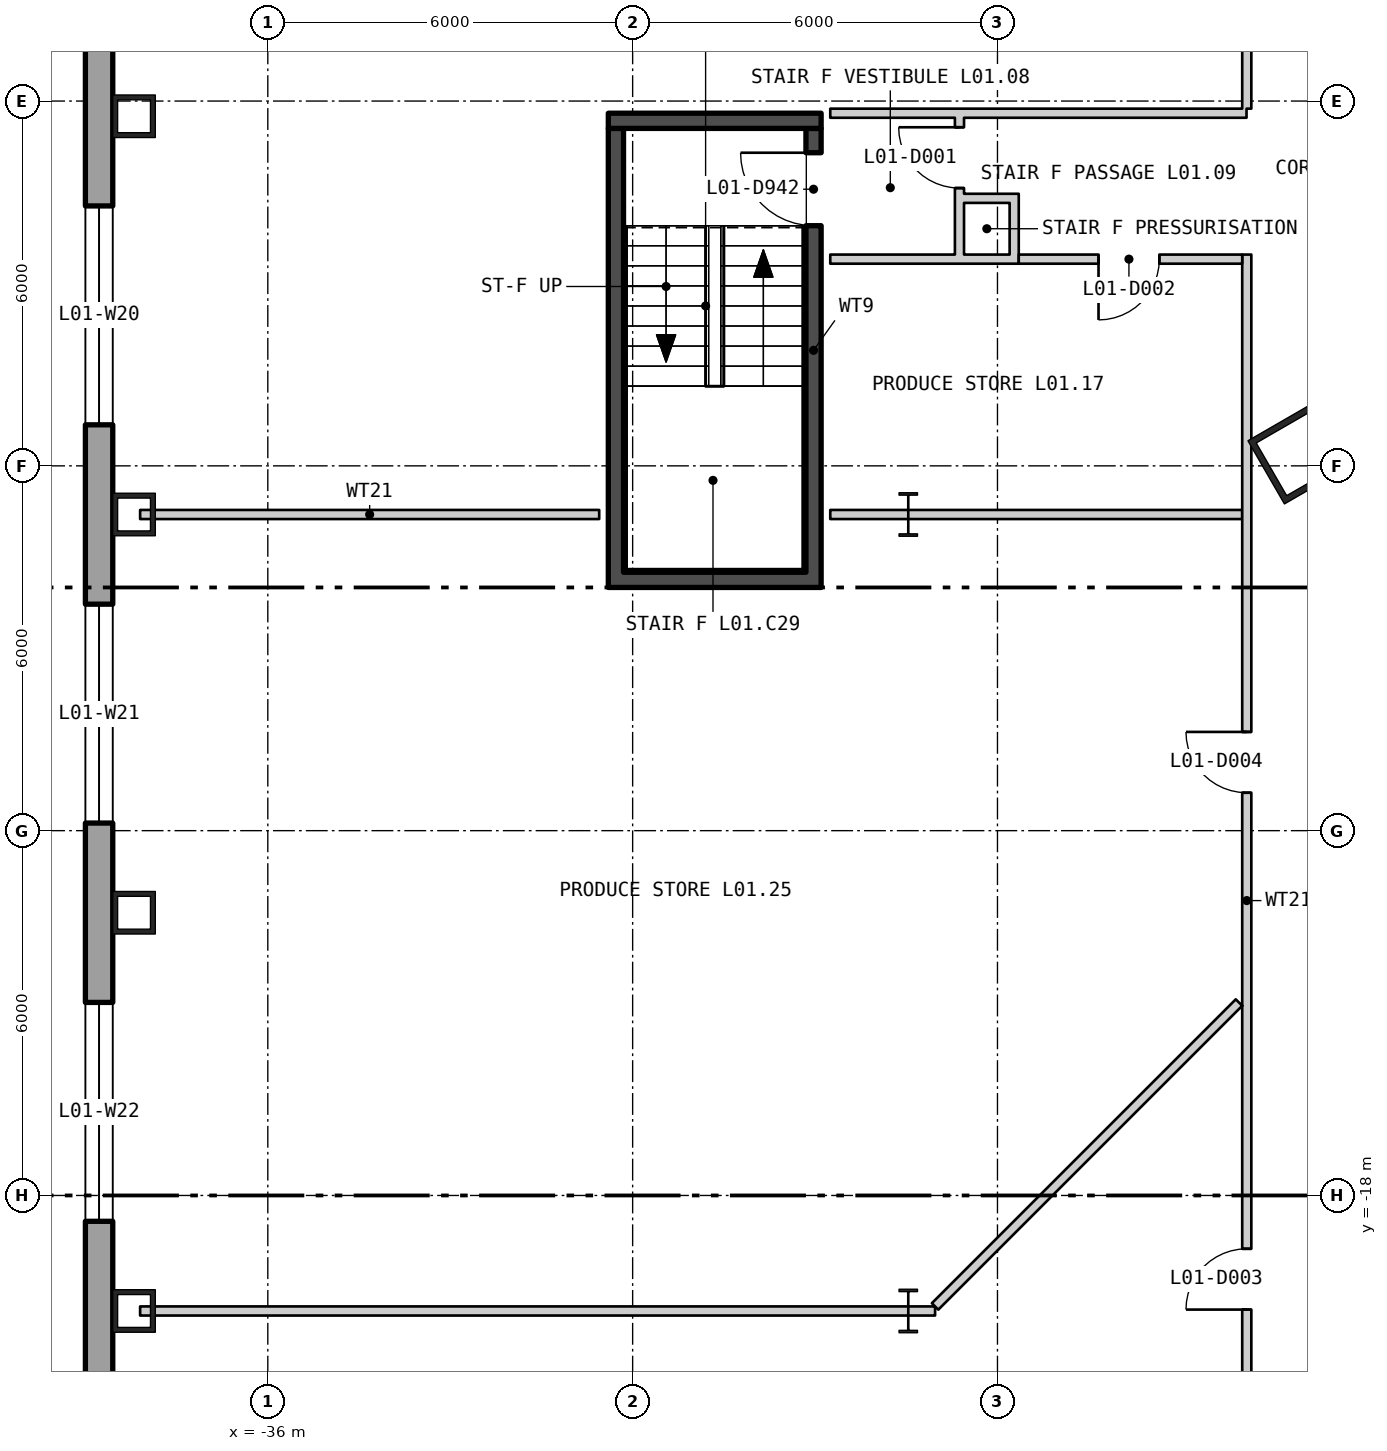
"""IFC4 building model, lengths in metres.
Left out: names, types, materials, properties, quantities, classifications, styles, units other than length and angle.
Written with IfcOpenShell. Run it as: python <this file> out.ifc"""

import sys

from ifc_helpers import new_model, si_unit, direction, frame, frame_2d, origin, origin_2d, place, context, subcontext, project, spatial, polyline, rectangle, hollow_rectangle, i_section, outline, extrude, element, fill, save


model = new_model("IFC4")
c1 = context("Model", 3, precision=1e-05, world=origin(), true_north=direction((0.0, 1.0)))
c2 = subcontext(c1, "Body", "Model", "MODEL_VIEW")
j1 = project(units=[si_unit("LENGTHUNIT", "METRE"), si_unit("PLANEANGLEUNIT", "RADIAN")], contexts=[c1])
p1 = place(None, origin())
s1 = spatial("IfcSite", under=j1, at=p1, CompositionType="ELEMENT")
p2 = place(p1, origin())
s2 = spatial("IfcBuilding", under=s1, at=p2, CompositionType="ELEMENT")
p3 = place(p2, frame((0.0, 0.0, 8.4)))
s3 = spatial("IfcBuildingStorey", under=s2, at=p3, CompositionType="ELEMENT", Elevation=8.4)
p4 = place(p3, frame((-19.061, -5.807, 0.0), z_axis=(0.0, 0.0, 1.0), x_axis=(0.5, -0.866025403784, 0.0)))
e1 = element("IfcColumn", 1, at=p4, inside=s3, PredefinedType="COLUMN", context=c2, shape_type="SweptSolid", body=[
    extrude(hollow_rectangle(XDim=1.2, YDim=1.2, WallThickness=0.1, at=origin_2d()), origin(), (0.0, 0.0, 1.0), 5.1),
])
for number, where, z_axis, x_axis in (
    (2, (-38.2, -0.25, 0.0), (0.0, 0.0, 1.0), (0.0, -1.0, 0.0)),
    (3, (-38.2, -6.8, 0.0), (0.0, 0.0, 1.0), (0.0, -1.0, 0.0)),
    (4, (-38.2, -13.35, 0.0), (0.0, 0.0, 1.0), (0.0, -1.0, 0.0)),
    (5, (-38.2, -19.9, 0.0), (0.0, 0.0, 1.0), (0.0, -1.0, 0.0)),
):
    element("IfcColumn", number, at=place(p3, frame(where, z_axis=z_axis, x_axis=x_axis)), inside=s3, PredefinedType="COLUMN", context=c2, shape_type="SweptSolid", body=[
        extrude(hollow_rectangle(XDim=0.7, YDim=0.7, WallThickness=0.08, at=origin_2d()), origin(), (0.0, 0.0, 1.0), 5.1),
    ])
for number, where, z_axis, x_axis in (
    (6, (-25.467, -6.8, 0.0), (0.0, 0.0, 1.0), (1.0, 0.0, 0.0)),
    (7, (-25.467, -19.9, 0.0), (0.0, 0.0, 1.0), (1.0, 0.0, 0.0)),
):
    element("IfcColumn", number, at=place(p3, frame(where, z_axis=z_axis, x_axis=x_axis)), inside=s3, PredefinedType="COLUMN", context=c2, shape_type="SweptSolid", body=[
        extrude(i_section(OverallWidth=0.304, OverallDepth=0.716, WebThickness=0.021, FlangeThickness=0.04, at=origin_2d()), origin(), (0.0, 0.0, 1.0), 5.1),
    ])
p5 = place(p3, frame((-38.775, 19.975, -0.4), z_axis=(0.0, 0.0, 1.0), x_axis=(0.0, -1.0, 0.0)))
e8 = element("IfcWall", 8, at=p5, inside=s3, PredefinedType="SOLIDWALL", context=c2, shape_type="SweptSolid", body=[
    extrude(outline(polyline([(-0.225, -0.225), (53.775, -0.225), (53.325, 0.225), (0.225, 0.225), (-0.225, -0.225)])), origin(), (0.0, 0.0, 1.0), 5.1),
])
p6 = place(p5, frame((2.05, 0.0, 1.3)))
e9 = element("IfcOpeningElement", 9, at=p6, cuts=e8, PredefinedType="OPENING", context=c2, shape_type="SweptSolid", body=[
    extrude(rectangle(XDim=3.6, YDim=3.2, at=frame_2d((1.8, 1.6))), frame((0.0, 0.235, 0.0), z_axis=(0.0, -1.0, 0.0), x_axis=(1.0, 0.0, 0.0)), (0.0, 0.0, 1.0), 0.47),
])
p7 = place(p5, frame((8.6, 0.0, 1.3)))
e10 = element("IfcOpeningElement", 10, at=p7, cuts=e8, PredefinedType="OPENING", context=c2, shape_type="SweptSolid", body=[
    extrude(rectangle(XDim=3.6, YDim=3.2, at=frame_2d((1.8, 1.6))), frame((0.0, 0.235, 0.0), z_axis=(0.0, -1.0, 0.0), x_axis=(1.0, 0.0, 0.0)), (0.0, 0.0, 1.0), 0.47),
])
p8 = place(p5, frame((15.15, 0.0, 1.3)))
e11 = element("IfcOpeningElement", 11, at=p8, cuts=e8, PredefinedType="OPENING", context=c2, shape_type="SweptSolid", body=[
    extrude(rectangle(XDim=3.6, YDim=3.2, at=frame_2d((1.8, 1.6))), frame((0.0, 0.235, 0.0), z_axis=(0.0, -1.0, 0.0), x_axis=(1.0, 0.0, 0.0)), (0.0, 0.0, 1.0), 0.47),
])
p9 = place(p5, frame((21.7, 0.0, 1.3)))
e12 = element("IfcOpeningElement", 12, at=p9, cuts=e8, PredefinedType="OPENING", context=c2, shape_type="SweptSolid", body=[
    extrude(rectangle(XDim=3.6, YDim=3.2, at=frame_2d((1.8, 1.6))), frame((0.0, 0.235, 0.0), z_axis=(0.0, -1.0, 0.0), x_axis=(1.0, 0.0, 0.0)), (0.0, 0.0, 1.0), 0.47),
])
p10 = place(p5, frame((28.25, 0.0, 1.3)))
e13 = element("IfcOpeningElement", 13, at=p10, cuts=e8, PredefinedType="OPENING", context=c2, shape_type="SweptSolid", body=[
    extrude(rectangle(XDim=3.6, YDim=3.2, at=frame_2d((1.8, 1.6))), frame((0.0, 0.235, 0.0), z_axis=(0.0, -1.0, 0.0), x_axis=(1.0, 0.0, 0.0)), (0.0, 0.0, 1.0), 0.47),
])
p11 = place(p5, frame((34.8, 0.0, 1.3)))
e14 = element("IfcOpeningElement", 14, at=p11, cuts=e8, PredefinedType="OPENING", context=c2, shape_type="SweptSolid", body=[
    extrude(rectangle(XDim=3.6, YDim=3.2, at=frame_2d((1.8, 1.6))), frame((0.0, 0.235, 0.0), z_axis=(0.0, -1.0, 0.0), x_axis=(1.0, 0.0, 0.0)), (0.0, 0.0, 1.0), 0.47),
])
p12 = place(p5, frame((41.35, 0.0, 1.3)))
e15 = element("IfcOpeningElement", 15, at=p12, cuts=e8, PredefinedType="OPENING", context=c2, shape_type="SweptSolid", body=[
    extrude(rectangle(XDim=3.6, YDim=3.2, at=frame_2d((1.8, 1.6))), frame((0.0, 0.235, 0.0), z_axis=(0.0, -1.0, 0.0), x_axis=(1.0, 0.0, 0.0)), (0.0, 0.0, 1.0), 0.47),
])
p13 = place(p5, frame((47.9, 0.0, 1.3)))
e16 = element("IfcOpeningElement", 16, at=p13, cuts=e8, PredefinedType="OPENING", context=c2, shape_type="SweptSolid", body=[
    extrude(rectangle(XDim=3.6, YDim=3.2, at=frame_2d((1.8, 1.6))), frame((0.0, 0.235, 0.0), z_axis=(0.0, -1.0, 0.0), x_axis=(1.0, 0.0, 0.0)), (0.0, 0.0, 1.0), 0.47),
])
p14 = place(p3, frame((-30.275, -7.75, 0.0), z_axis=(0.0, 0.0, 1.0), x_axis=(0.0, 1.0, 0.0)))
e17 = element("IfcWall", 17, at=p14, inside=s3, PredefinedType="SHEAR", context=c2, shape_type="SweptSolid", body=[
    extrude(rectangle(XDim=7.3, YDim=0.25, at=frame_2d((3.65, 0.0))), origin(), (0.0, 0.0, 1.0), 4.88),
])
p15 = place(p3, frame((-27.025, -7.75, 0.0), z_axis=(0.0, 0.0, 1.0), x_axis=(0.0, 1.0, 0.0)))
e18 = element("IfcWall", 18, at=p15, inside=s3, PredefinedType="SHEAR", context=c2, shape_type="SweptSolid", body=[
    extrude(rectangle(XDim=7.3, YDim=0.25, at=frame_2d((3.65, 0.0))), origin(), (0.0, 0.0, 1.0), 4.88),
])
p16 = place(p15, frame((5.7, 0.0, 0.0)))
e19 = element("IfcOpeningElement", 19, at=p16, cuts=e18, PredefinedType="OPENING", context=c2, shape_type="SweptSolid", body=[
    extrude(rectangle(XDim=1.2, YDim=2.1, at=frame_2d((0.6, 1.05))), frame((0.0, 0.135, 0.0), z_axis=(0.0, -1.0, 0.0), x_axis=(1.0, 0.0, 0.0)), (0.0, 0.0, 1.0), 0.27),
])
for number, where, z_axis, x_axis in (
    (20, (-30.4, -7.875, 0.0), (0.0, 0.0, 1.0), (1.0, 0.0, 0.0)),
    (21, (-30.4, -0.325, 0.0), (0.0, 0.0, 1.0), (1.0, 0.0, 0.0)),
):
    element("IfcWall", number, at=place(p3, frame(where, z_axis=z_axis, x_axis=x_axis)), inside=s3, PredefinedType="SHEAR", context=c2, shape_type="SweptSolid", body=[
        extrude(rectangle(XDim=3.5, YDim=0.25, at=frame_2d((1.75, 0.0))), origin(), (0.0, 0.0, 1.0), 4.88),
    ])
p17 = place(p3, frame((-38.1, -19.9, 0.0), z_axis=(0.0, 0.0, 1.0), x_axis=(1.0, 0.0, 0.0)))
e22 = element("IfcWall", 22, at=p17, inside=s3, PredefinedType="PARTITIONING", context=c2, shape_type="SweptSolid", body=[
    extrude(rectangle(XDim=12.633, YDim=0.15, at=frame_2d((6.316, 0.0))), origin(), (0.0, 0.0, 1.0), 4.09),
])
p18 = place(p3, frame((-25.467, -19.9, 0.0), z_axis=(0.0, 0.0, 1.0), x_axis=(1.0, 0.0, 0.0)))
e23 = element("IfcWall", 23, at=p18, inside=s3, PredefinedType="PARTITIONING", context=c2, shape_type="SweptSolid", body=[
    extrude(rectangle(XDim=0.441, YDim=0.15, at=frame_2d((0.221, 0.0))), origin(), (0.0, 0.0, 1.0), 4.88),
])
p19 = place(p3, frame((-38.1, -6.8, 0.0), z_axis=(0.0, 0.0, 1.0), x_axis=(1.0, 0.0, 0.0)))
e24 = element("IfcWall", 24, at=p19, inside=s3, PredefinedType="PARTITIONING", context=c2, shape_type="SweptSolid", body=[
    extrude(rectangle(XDim=7.55, YDim=0.15, at=frame_2d((3.775, 0.0))), origin(), (0.0, 0.0, 1.0), 4.09),
])
p20 = place(p3, frame((-26.75, -6.8, 0.0), z_axis=(0.0, 0.0, 1.0), x_axis=(1.0, 0.0, 0.0)))
e25 = element("IfcWall", 25, at=p20, inside=s3, PredefinedType="PARTITIONING", context=c2, shape_type="SweptSolid", body=[
    extrude(rectangle(XDim=6.775, YDim=0.15, at=frame_2d((3.388, 0.0))), origin(), (0.0, 0.0, 1.0), 4.09),
])
p21 = place(p3, frame((-26.75, -2.6, 0.0), z_axis=(0.0, 0.0, 1.0), x_axis=(1.0, 0.0, 0.0)))
e26 = element("IfcWall", 26, at=p21, inside=s3, PredefinedType="PARTITIONING", context=c2, shape_type="SweptSolid", body=[
    extrude(rectangle(XDim=2.05, YDim=0.15, at=frame_2d((1.025, 0.0))), origin(), (0.0, 0.0, 1.0), 4.88),
])
p22 = place(p3, frame((-26.75, -0.2, 0.0), z_axis=(0.0, 0.0, 1.0), x_axis=(1.0, 0.0, 0.0)))
e27 = element("IfcWall", 27, at=p22, inside=s3, PredefinedType="PARTITIONING", context=c2, shape_type="SweptSolid", body=[
    extrude(rectangle(XDim=6.846, YDim=0.15, at=frame_2d((3.423, 0.0))), origin(), (0.0, 0.0, 1.0), 4.88),
])
p23 = place(p3, frame((-25.026, -19.825, 0.0), z_axis=(0.0, 0.0, 1.0), x_axis=(0.707106781187, 0.707106781187, 0.0)))
e28 = element("IfcWall", 28, at=p23, inside=s3, PredefinedType="PARTITIONING", context=c2, shape_type="SweptSolid", body=[
    extrude(rectangle(XDim=7.068, YDim=0.15, at=frame_2d((3.534, 0.0))), origin(), (0.0, 0.0, 1.0), 4.88),
])
p24 = place(p3, frame((-24.625, -2.675, 0.0), z_axis=(0.0, 0.0, 1.0), x_axis=(0.0, 1.0, 0.0)))
e29 = element("IfcWall", 29, at=p24, inside=s3, PredefinedType="PARTITIONING", context=c2, shape_type="SweptSolid", body=[
    extrude(rectangle(XDim=1.087, YDim=0.15, at=frame_2d((0.543, 0.0))), origin(), (0.0, 0.0, 1.0), 4.88),
])
p25 = place(p3, frame((-24.625, -1.588, 0.0), z_axis=(0.0, 0.0, 1.0), x_axis=(0.0, 1.0, 0.0)))
e30 = element("IfcWall", 30, at=p25, inside=s3, PredefinedType="PARTITIONING", context=c2, shape_type="SweptSolid", body=[
    extrude(rectangle(XDim=1.313, YDim=0.15, at=frame_2d((0.656, 0.0))), origin(), (0.0, 0.0, 1.0), 4.88),
])
p26 = place(p25, frame((0.157, 0.0, 0.0)))
e31 = element("IfcOpeningElement", 31, at=p26, cuts=e30, PredefinedType="OPENING", context=c2, shape_type="SweptSolid", body=[
    extrude(rectangle(XDim=1.0, YDim=2.1, at=frame_2d((0.5, 1.05))), frame((0.0, 0.085, 0.0), z_axis=(0.0, -1.0, 0.0), x_axis=(1.0, 0.0, 0.0)), (0.0, 0.0, 1.0), 0.17),
])
for number, where, z_axis, x_axis in (
    (32, (-24.55, -2.6, 0.0), (0.0, 0.0, 1.0), (1.0, 0.0, 0.0)),
    (33, (-24.55, -1.6, 0.0), (0.0, 0.0, 1.0), (1.0, 0.0, 0.0)),
):
    element("IfcWall", number, at=place(p3, frame(where, z_axis=z_axis, x_axis=x_axis)), inside=s3, PredefinedType="PARTITIONING", context=c2, shape_type="SweptSolid", body=[
        extrude(rectangle(XDim=0.75, YDim=0.15, at=frame_2d((0.375, 0.0))), origin(), (0.0, 0.0, 1.0), 4.88),
    ])
p27 = place(p3, frame((-23.725, -2.675, 0.0), z_axis=(0.0, 0.0, 1.0), x_axis=(0.0, 1.0, 0.0)))
e34 = element("IfcWall", 34, at=p27, inside=s3, PredefinedType="PARTITIONING", context=c2, shape_type="SweptSolid", body=[
    extrude(rectangle(XDim=1.15, YDim=0.15, at=frame_2d((0.575, 0.0))), origin(), (0.0, 0.0, 1.0), 4.88),
])
p28 = place(p3, frame((-23.65, -2.6, 0.0), z_axis=(0.0, 0.0, 1.0), x_axis=(1.0, 0.0, 0.0)))
e35 = element("IfcWall", 35, at=p28, inside=s3, PredefinedType="PARTITIONING", context=c2, shape_type="SweptSolid", body=[
    extrude(rectangle(XDim=3.675, YDim=0.15, at=frame_2d((1.837, 0.0))), origin(), (0.0, 0.0, 1.0), 4.88),
])
p29 = place(p28, frame((1.312, 0.0, 0.0)))
e36 = element("IfcOpeningElement", 36, at=p29, cuts=e35, PredefinedType="OPENING", context=c2, shape_type="SweptSolid", body=[
    extrude(rectangle(XDim=1.0, YDim=2.1, at=frame_2d((0.5, 1.05))), frame((0.0, 0.085, 0.0), z_axis=(0.0, -1.0, 0.0), x_axis=(1.0, 0.0, 0.0)), (0.0, 0.0, 1.0), 0.17),
])
p30 = place(p3, frame((-19.9, -23.775, 0.0), z_axis=(0.0, 0.0, 1.0), x_axis=(0.0, 1.0, 0.0)))
e37 = element("IfcWall", 37, at=p30, inside=s3, PredefinedType="PARTITIONING", context=c2, shape_type="SweptSolid", body=[
    extrude(rectangle(XDim=21.25, YDim=0.15, at=frame_2d((10.625, 0.0))), origin(), (0.0, 0.0, 1.0), 4.88),
])
p31 = place(p30, frame((3.898, 0.0, 0.0)))
e38 = element("IfcOpeningElement", 38, at=p31, cuts=e37, PredefinedType="OPENING", context=c2, shape_type="SweptSolid", body=[
    extrude(rectangle(XDim=1.0, YDim=2.1, at=frame_2d((0.5, 1.05))), frame((0.0, 0.085, 0.0), z_axis=(0.0, -1.0, 0.0), x_axis=(1.0, 0.0, 0.0)), (0.0, 0.0, 1.0), 0.17),
])
p32 = place(p30, frame((12.399, 0.0, 0.0)))
e39 = element("IfcOpeningElement", 39, at=p32, cuts=e37, PredefinedType="OPENING", context=c2, shape_type="SweptSolid", body=[
    extrude(rectangle(XDim=1.0, YDim=2.1, at=frame_2d((0.5, 1.05))), frame((0.0, 0.085, 0.0), z_axis=(0.0, -1.0, 0.0), x_axis=(1.0, 0.0, 0.0)), (0.0, 0.0, 1.0), 0.17),
])
p33 = place(p3, frame((-19.9, -0.125, 0.0), z_axis=(0.0, 0.0, 1.0), x_axis=(0.0, 1.0, 0.0)))
e40 = element("IfcWall", 40, at=p33, inside=s3, PredefinedType="PARTITIONING", context=c2, shape_type="SweptSolid", body=[
    extrude(rectangle(XDim=1.221, YDim=0.15, at=frame_2d((0.611, 0.0))), origin(), (0.0, 0.0, 1.0), 4.88),
])
p34 = place(p9, origin())
e41 = element("IfcWindow", 41, at=p34, inside=s3, PartitioningType="SINGLE_PANEL", PredefinedType="WINDOW", context=c2, shape_type="SweptSolid", body=[
    extrude(rectangle(XDim=3.6, YDim=3.2, at=frame_2d((1.8, 1.6))), frame((0.0, 0.105, 0.0), z_axis=(0.0, -1.0, 0.0), x_axis=(1.0, 0.0, 0.0)), (0.0, 0.0, 1.0), 0.06),
])
fill(e12, e41)
p35 = place(p10, origin())
e42 = element("IfcWindow", 42, at=p35, inside=s3, PartitioningType="SINGLE_PANEL", PredefinedType="WINDOW", context=c2, shape_type="SweptSolid", body=[
    extrude(rectangle(XDim=3.6, YDim=3.2, at=frame_2d((1.8, 1.6))), frame((0.0, 0.105, 0.0), z_axis=(0.0, -1.0, 0.0), x_axis=(1.0, 0.0, 0.0)), (0.0, 0.0, 1.0), 0.06),
])
fill(e13, e42)
p36 = place(p11, origin())
e43 = element("IfcWindow", 43, at=p36, inside=s3, PartitioningType="SINGLE_PANEL", PredefinedType="WINDOW", context=c2, shape_type="SweptSolid", body=[
    extrude(rectangle(XDim=3.6, YDim=3.2, at=frame_2d((1.8, 1.6))), frame((0.0, 0.105, 0.0), z_axis=(0.0, -1.0, 0.0), x_axis=(1.0, 0.0, 0.0)), (0.0, 0.0, 1.0), 0.06),
])
fill(e14, e43)
p37 = place(p16, origin())
e44 = element("IfcDoor", 44, at=p37, inside=s3, OperationType="SINGLE_SWING_LEFT", PredefinedType="DOOR", context=c2, shape_type="SweptSolid", body=[
    extrude(rectangle(XDim=1.2, YDim=2.1, at=frame_2d((0.6, 1.05))), frame((0.0, 0.025, 0.0), z_axis=(0.0, -1.0, 0.0), x_axis=(1.0, 0.0, 0.0)), (0.0, 0.0, 1.0), 0.05),
])
fill(e19, e44)
p38 = place(p26, origin())
e45 = element("IfcDoor", 45, at=p38, inside=s3, OperationType="SINGLE_SWING_LEFT", PredefinedType="DOOR", context=c2, shape_type="SweptSolid", body=[
    extrude(rectangle(XDim=1.0, YDim=2.1, at=frame_2d((0.5, 1.05))), frame((0.0, 0.025, 0.0), z_axis=(0.0, -1.0, 0.0), x_axis=(1.0, 0.0, 0.0)), (0.0, 0.0, 1.0), 0.05),
])
fill(e31, e45)
p39 = place(p29, origin())
e46 = element("IfcDoor", 46, at=p39, inside=s3, OperationType="SINGLE_SWING_LEFT", PredefinedType="DOOR", context=c2, shape_type="SweptSolid", body=[
    extrude(rectangle(XDim=1.0, YDim=2.1, at=frame_2d((0.5, 1.05))), frame((0.0, 0.025, 0.0), z_axis=(0.0, -1.0, 0.0), x_axis=(1.0, 0.0, 0.0)), (0.0, 0.0, 1.0), 0.05),
])
fill(e36, e46)
p40 = place(p31, origin())
e47 = element("IfcDoor", 47, at=p40, inside=s3, OperationType="SINGLE_SWING_RIGHT", PredefinedType="DOOR", context=c2, shape_type="SweptSolid", body=[
    extrude(rectangle(XDim=1.0, YDim=2.1, at=frame_2d((0.5, 1.05))), frame((0.0, 0.025, 0.0), z_axis=(0.0, -1.0, 0.0), x_axis=(1.0, 0.0, 0.0)), (0.0, 0.0, 1.0), 0.05),
])
fill(e38, e47)
p41 = place(p32, origin())
e48 = element("IfcDoor", 48, at=p41, inside=s3, OperationType="SINGLE_SWING_LEFT", PredefinedType="DOOR", context=c2, shape_type="SweptSolid", body=[
    extrude(rectangle(XDim=1.0, YDim=2.1, at=frame_2d((0.5, 1.05))), frame((0.0, 0.025, 0.0), z_axis=(0.0, -1.0, 0.0), x_axis=(1.0, 0.0, 0.0)), (0.0, 0.0, 1.0), 0.05),
])
fill(e39, e48)
save(model, sys.argv[1])
